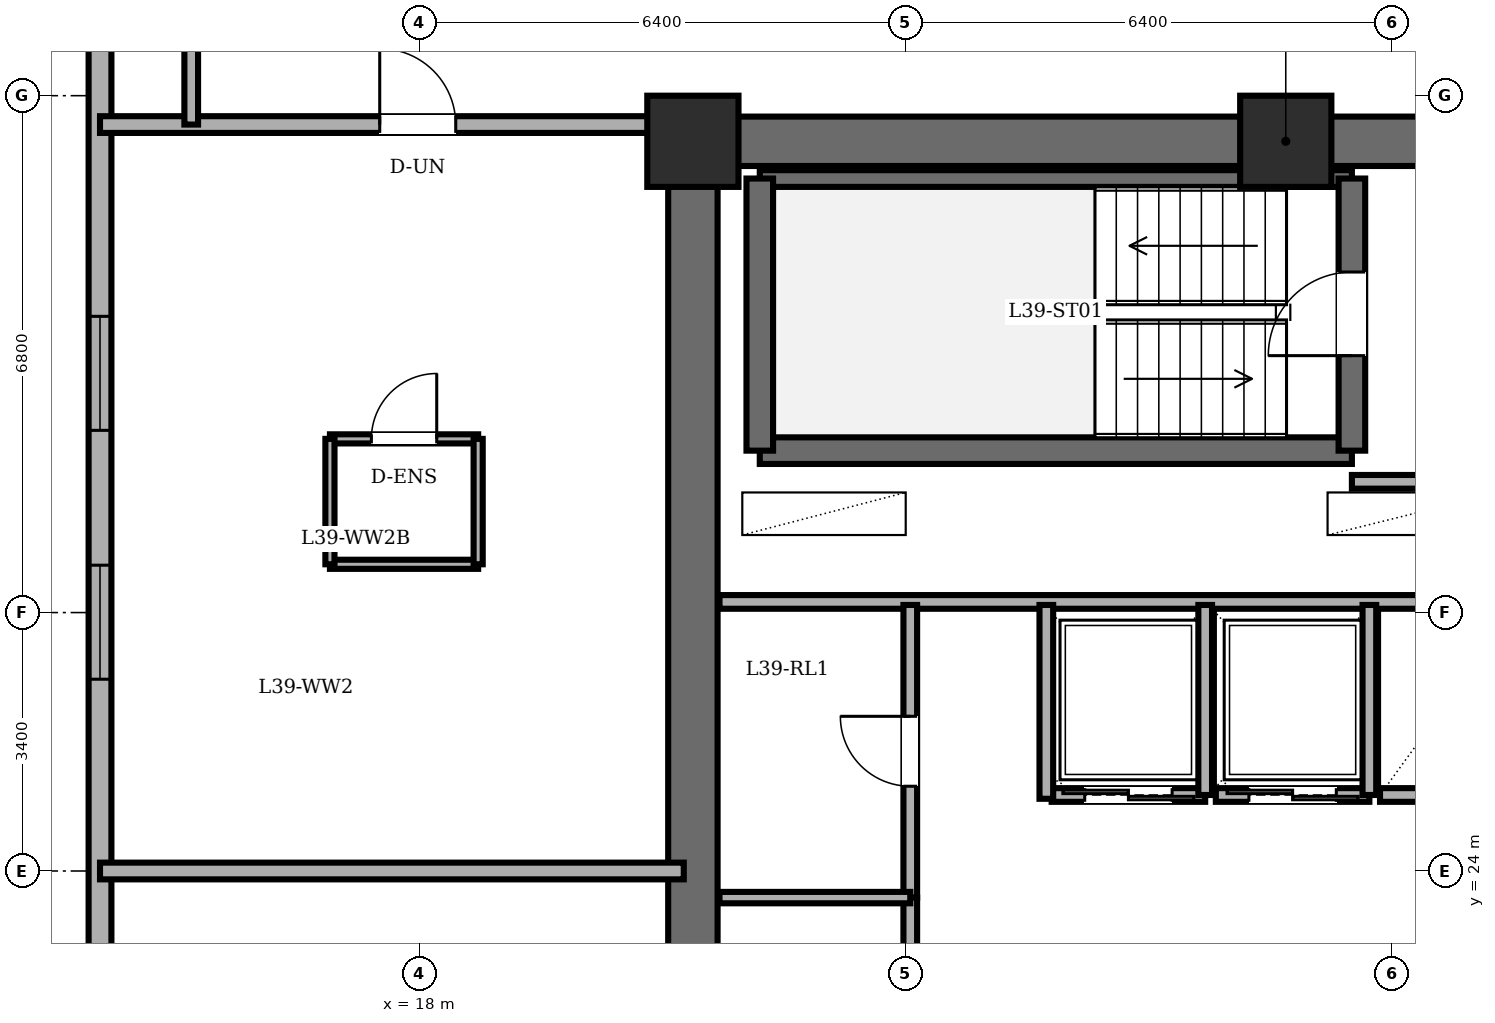
"""IFC4 building model, lengths in metres.
Left out: names, types, materials, properties, quantities, classifications, styles, units other than length and angle.
Written with IfcOpenShell. Run it as: python <this file> out.ifc"""

import sys

from ifc_helpers import new_model, si_unit, direction, frame, frame_2d, origin, origin_2d, place, context, subcontext, project, spatial, rectangle, extrude, element, fill, save


model = new_model("IFC4")
c1 = context("Model", 3, precision=1e-05, world=origin(), true_north=direction((0.0, 1.0)))
c2 = subcontext(c1, "Body", "Model", "MODEL_VIEW")
j1 = project(units=[si_unit("LENGTHUNIT", "METRE"), si_unit("PLANEANGLEUNIT", "RADIAN")], contexts=[c1])
p1 = place(None, origin())
s1 = spatial("IfcSite", under=j1, at=p1, CompositionType="ELEMENT")
p2 = place(p1, origin())
s2 = spatial("IfcBuilding", under=s1, at=p2, CompositionType="ELEMENT")
p3 = place(p2, frame((0.0, 0.0, 151.0)))
s3 = spatial("IfcBuildingStorey", under=s2, at=p3, CompositionType="ELEMENT", Elevation=151.0)
for number, where, z_axis, x_axis in (
    (1, (29.4, 33.6, 0.0), (0.0, 0.0, 1.0), (1.0, 0.0, 0.0)),
    (2, (21.6, 33.6, 0.0), (0.0, 0.0, 1.0), (1.0, 0.0, 0.0)),
):
    element("IfcColumn", number, at=place(p3, frame(where, z_axis=z_axis, x_axis=x_axis)), inside=s3, PredefinedType="COLUMN", context=c2, shape_type="SweptSolid", body=[
        extrude(rectangle(XDim=1.2, YDim=1.2, at=origin_2d()), origin(), (0.0, 0.0, 1.0), 3.6),
    ])
p4 = place(p3, frame((13.8, 36.3, 0.0), z_axis=(0.0, 0.0, 1.0), x_axis=(0.0, -1.0, 0.0)))
e3 = element("IfcWall", 3, at=p4, inside=s3, PredefinedType="SOLIDWALL", context=c2, shape_type="SweptSolid", body=[
    extrude(rectangle(XDim=24.6, YDim=0.3, at=frame_2d((12.3, 0.0))), origin(), (0.0, 0.0, 1.0), 3.4),
])
p5 = place(p4, frame((5.003, 0.0, 0.85)))
e4 = element("IfcOpeningElement", 4, at=p5, cuts=e3, PredefinedType="OPENING", context=c2, shape_type="SweptSolid", body=[
    extrude(rectangle(XDim=1.5, YDim=1.55, at=frame_2d((0.75, 0.775))), frame((0.0, 0.16, 0.0), z_axis=(0.0, -1.0, 0.0), x_axis=(1.0, 0.0, 0.0)), (0.0, 0.0, 1.0), 0.32),
])
p6 = place(p4, frame((8.277, 0.0, 0.85)))
e5 = element("IfcOpeningElement", 5, at=p6, cuts=e3, PredefinedType="OPENING", context=c2, shape_type="SweptSolid", body=[
    extrude(rectangle(XDim=1.5, YDim=1.55, at=frame_2d((0.75, 0.775))), frame((0.0, 0.16, 0.0), z_axis=(0.0, -1.0, 0.0), x_axis=(1.0, 0.0, 0.0)), (0.0, 0.0, 1.0), 0.32),
])
p7 = place(p4, frame((14.823, 0.0, 0.85)))
e6 = element("IfcOpeningElement", 6, at=p7, cuts=e3, PredefinedType="OPENING", context=c2, shape_type="SweptSolid", body=[
    extrude(rectangle(XDim=1.5, YDim=1.55, at=frame_2d((0.75, 0.775))), frame((0.0, 0.16, 0.0), z_axis=(0.0, -1.0, 0.0), x_axis=(1.0, 0.0, 0.0)), (0.0, 0.0, 1.0), 0.32),
])
p8 = place(p4, frame((18.097, 0.0, 0.85)))
e7 = element("IfcOpeningElement", 7, at=p8, cuts=e3, PredefinedType="OPENING", context=c2, shape_type="SweptSolid", body=[
    extrude(rectangle(XDim=1.5, YDim=1.55, at=frame_2d((0.75, 0.775))), frame((0.0, 0.16, 0.0), z_axis=(0.0, -1.0, 0.0), x_axis=(1.0, 0.0, 0.0)), (0.0, 0.0, 1.0), 0.32),
])
p9 = place(p3, frame((21.6, 14.4, 0.0), z_axis=(0.0, 0.0, 1.0), x_axis=(0.0, 1.0, 0.0)))
e8 = element("IfcWall", 8, at=p9, inside=s3, PredefinedType="SHEAR", context=c2, shape_type="SweptSolid", body=[
    extrude(rectangle(XDim=19.2, YDim=0.65, at=frame_2d((9.6, 0.0))), origin(), (0.0, 0.0, 1.0), 3.4),
])
p10 = place(p3, frame((21.6, 33.6, 0.0), z_axis=(0.0, 0.0, 1.0), x_axis=(1.0, 0.0, 0.0)))
e9 = element("IfcWall", 9, at=p10, inside=s3, PredefinedType="SHEAR", context=c2, shape_type="SweptSolid", body=[
    extrude(rectangle(XDim=15.6, YDim=0.65, at=frame_2d((7.8, 0.0))), origin(), (0.0, 0.0, 1.0), 3.4),
])
p11 = place(p3, frame((22.48, 29.53, 0.0), z_axis=(0.0, 0.0, 1.0), x_axis=(1.0, 0.0, 0.0)))
e10 = element("IfcWall", 10, at=p11, inside=s3, PredefinedType="SOLIDWALL", context=c2, shape_type="SweptSolid", body=[
    extrude(rectangle(XDim=7.79, YDim=0.35, at=frame_2d((3.895, 0.0))), origin(), (0.0, 0.0, 1.0), 3.4),
])
p12 = place(p3, frame((22.48, 33.11, 0.0), z_axis=(0.0, 0.0, 1.0), x_axis=(1.0, 0.0, 0.0)))
e11 = element("IfcWall", 11, at=p12, inside=s3, PredefinedType="PARTITIONING", context=c2, shape_type="SweptSolid", body=[
    extrude(rectangle(XDim=7.79, YDim=0.22, at=frame_2d((3.895, 0.0))), origin(), (0.0, 0.0, 1.0), 3.4),
])
p13 = place(p3, frame((22.48, 29.53, 0.0), z_axis=(0.0, 0.0, 1.0), x_axis=(0.0, 1.0, 0.0)))
e12 = element("IfcWall", 12, at=p13, inside=s3, PredefinedType="SOLIDWALL", context=c2, shape_type="SweptSolid", body=[
    extrude(rectangle(XDim=3.58, YDim=0.35, at=frame_2d((1.79, 0.0))), origin(), (0.0, 0.0, 1.0), 3.4),
])
p14 = place(p3, frame((30.27, 29.53, 0.0), z_axis=(0.0, 0.0, 1.0), x_axis=(0.0, 1.0, 0.0)))
e13 = element("IfcWall", 13, at=p14, inside=s3, PredefinedType="SOLIDWALL", context=c2, shape_type="SweptSolid", body=[
    extrude(rectangle(XDim=3.58, YDim=0.35, at=frame_2d((1.79, 0.0))), origin(), (0.0, 0.0, 1.0), 3.4),
])
p15 = place(p14, frame((1.25, 0.0, 0.0)))
e14 = element("IfcOpeningElement", 14, at=p15, cuts=e13, PredefinedType="OPENING", context=c2, shape_type="SweptSolid", body=[
    extrude(rectangle(XDim=1.1, YDim=2.15, at=frame_2d((0.55, 1.075))), frame((0.0, 0.185, 0.0), z_axis=(0.0, -1.0, 0.0), x_axis=(1.0, 0.0, 0.0)), (0.0, 0.0, 1.0), 0.37),
])
p16 = place(p3, frame((30.27, 29.12, 0.0), z_axis=(0.0, 0.0, 1.0), x_axis=(1.0, 0.0, 0.0)))
e15 = element("IfcWall", 15, at=p16, inside=s3, PredefinedType="PARTITIONING", context=c2, shape_type="SweptSolid", body=[
    extrude(rectangle(XDim=2.24, YDim=0.18, at=frame_2d((1.12, 0.0))), origin(), (0.0, 0.0, 1.0), 3.4),
])
p17 = place(p3, frame((21.95, 27.54, 0.0), z_axis=(0.0, 0.0, 1.0), x_axis=(1.0, 0.0, 0.0)))
e16 = element("IfcWall", 16, at=p17, inside=s3, PredefinedType="PARTITIONING", context=c2, shape_type="SweptSolid", body=[
    extrude(rectangle(XDim=10.56, YDim=0.18, at=frame_2d((5.28, 0.0))), origin(), (0.0, 0.0, 1.0), 3.4),
])
p18 = place(p3, frame((28.34, 25.0, 0.0), z_axis=(0.0, 0.0, 1.0), x_axis=(-1.0, 0.0, 0.0)))
e17 = element("IfcWall", 17, at=p18, inside=s3, PredefinedType="PARTITIONING", context=c2, shape_type="SweptSolid", body=[
    extrude(rectangle(XDim=2.02, YDim=0.18, at=frame_2d((1.01, 0.0))), origin(), (0.0, 0.0, 1.0), 3.4),
])
p19 = place(p18, frame((0.435, 0.0, 0.0)))
e18 = element("IfcOpeningElement", 18, at=p19, cuts=e17, PredefinedType="OPENING", context=c2, shape_type="SweptSolid", body=[
    extrude(rectangle(XDim=1.15, YDim=2.2, at=frame_2d((0.575, 1.1))), frame((0.0, 0.1, 0.0), z_axis=(0.0, -1.0, 0.0), x_axis=(1.0, 0.0, 0.0)), (0.0, 0.0, 1.0), 0.2),
])
p20 = place(p3, frame((28.34, 25.0, 0.0), z_axis=(0.0, 0.0, 1.0), x_axis=(0.0, 1.0, 0.0)))
e19 = element("IfcWall", 19, at=p20, inside=s3, PredefinedType="PARTITIONING", context=c2, shape_type="SweptSolid", body=[
    extrude(rectangle(XDim=2.5, YDim=0.18, at=frame_2d((1.25, 0.0))), origin(), (0.0, 0.0, 1.0), 3.4),
])
p21 = place(p3, frame((30.5, 25.0, 0.0), z_axis=(0.0, 0.0, 1.0), x_axis=(-1.0, 0.0, 0.0)))
e20 = element("IfcWall", 20, at=p21, inside=s3, PredefinedType="PARTITIONING", context=c2, shape_type="SweptSolid", body=[
    extrude(rectangle(XDim=2.02, YDim=0.18, at=frame_2d((1.01, 0.0))), origin(), (0.0, 0.0, 1.0), 3.4),
])
p22 = place(p21, frame((0.435, 0.0, 0.0)))
e21 = element("IfcOpeningElement", 21, at=p22, cuts=e20, PredefinedType="OPENING", context=c2, shape_type="SweptSolid", body=[
    extrude(rectangle(XDim=1.15, YDim=2.2, at=frame_2d((0.575, 1.1))), frame((0.0, 0.1, 0.0), z_axis=(0.0, -1.0, 0.0), x_axis=(1.0, 0.0, 0.0)), (0.0, 0.0, 1.0), 0.2),
])
p23 = place(p3, frame((30.5, 25.0, 0.0), z_axis=(0.0, 0.0, 1.0), x_axis=(0.0, 1.0, 0.0)))
e22 = element("IfcWall", 22, at=p23, inside=s3, PredefinedType="PARTITIONING", context=c2, shape_type="SweptSolid", body=[
    extrude(rectangle(XDim=2.5, YDim=0.18, at=frame_2d((1.25, 0.0))), origin(), (0.0, 0.0, 1.0), 3.4),
])
p24 = place(p3, frame((32.46, 25.0, 0.0), z_axis=(0.0, 0.0, 1.0), x_axis=(-1.0, 0.0, 0.0)))
e23 = element("IfcWall", 23, at=p24, inside=s3, PredefinedType="PARTITIONING", context=c2, shape_type="SweptSolid", body=[
    extrude(rectangle(XDim=1.82, YDim=0.18, at=frame_2d((0.91, 0.0))), origin(), (0.0, 0.0, 1.0), 3.4),
])
p25 = place(p3, frame((24.46, 23.65, 0.0), z_axis=(0.0, 0.0, 1.0), x_axis=(0.0, 1.0, 0.0)))
e24 = element("IfcWall", 24, at=p25, inside=s3, PredefinedType="PARTITIONING", context=c2, shape_type="SweptSolid", body=[
    extrude(rectangle(XDim=3.85, YDim=0.18, at=frame_2d((1.925, 0.0))), origin(), (0.0, 0.0, 1.0), 3.4),
])
p26 = place(p25, frame((1.465, 0.0, 0.0)))
e25 = element("IfcOpeningElement", 25, at=p26, cuts=e24, PredefinedType="OPENING", context=c2, shape_type="SweptSolid", body=[
    extrude(rectangle(XDim=0.92, YDim=2.1, at=frame_2d((0.46, 1.05))), frame((0.0, 0.1, 0.0), z_axis=(0.0, -1.0, 0.0), x_axis=(1.0, 0.0, 0.0)), (0.0, 0.0, 1.0), 0.2),
])
p27 = place(p3, frame((24.46, 19.8, 0.0), z_axis=(0.0, 0.0, 1.0), x_axis=(0.0, 1.0, 0.0)))
e26 = element("IfcWall", 26, at=p27, inside=s3, PredefinedType="PARTITIONING", context=c2, shape_type="SweptSolid", body=[
    extrude(rectangle(XDim=3.85, YDim=0.18, at=frame_2d((1.925, 0.0))), origin(), (0.0, 0.0, 1.0), 3.4),
])
p28 = place(p27, frame((1.465, 0.0, 0.0)))
e27 = element("IfcOpeningElement", 27, at=p28, cuts=e26, PredefinedType="OPENING", context=c2, shape_type="SweptSolid", body=[
    extrude(rectangle(XDim=0.92, YDim=2.1, at=frame_2d((0.46, 1.05))), frame((0.0, 0.1, 0.0), z_axis=(0.0, -1.0, 0.0), x_axis=(1.0, 0.0, 0.0)), (0.0, 0.0, 1.0), 0.2),
])
p29 = place(p3, frame((21.95, 23.65, 0.0), z_axis=(0.0, 0.0, 1.0), x_axis=(1.0, 0.0, 0.0)))
e28 = element("IfcWall", 28, at=p29, inside=s3, PredefinedType="PARTITIONING", context=c2, shape_type="SweptSolid", body=[
    extrude(rectangle(XDim=2.51, YDim=0.15, at=frame_2d((1.255, 0.0))), origin(), (0.0, 0.0, 1.0), 3.4),
])
p30 = place(p3, frame((26.25, 24.95, 0.0), z_axis=(0.0, 0.0, 1.0), x_axis=(0.0, 1.0, 0.0)))
e29 = element("IfcWall", 29, at=p30, inside=s3, PredefinedType="PARTITIONING", context=c2, shape_type="SweptSolid", body=[
    extrude(rectangle(XDim=2.55, YDim=0.18, at=frame_2d((1.275, 0.0))), origin(), (0.0, 0.0, 1.0), 3.4),
])
p31 = place(p3, frame((16.825, 29.685, 0.0), z_axis=(0.0, 0.0, 1.0), x_axis=(1.0, 0.0, 0.0)))
e30 = element("IfcWall", 30, at=p31, inside=s3, PredefinedType="PARTITIONING", context=c2, shape_type="SweptSolid", body=[
    extrude(rectangle(XDim=1.95, YDim=0.12, at=frame_2d((0.975, 0.0))), origin(), (0.0, 0.0, 1.0), 3.4),
])
p32 = place(p31, frame((0.545, 0.0, 0.0)))
e31 = element("IfcOpeningElement", 31, at=p32, cuts=e30, PredefinedType="OPENING", context=c2, shape_type="SweptSolid", body=[
    extrude(rectangle(XDim=0.86, YDim=2.1, at=frame_2d((0.43, 1.05))), frame((0.0, 0.07, 0.0), z_axis=(0.0, -1.0, 0.0), x_axis=(1.0, 0.0, 0.0)), (0.0, 0.0, 1.0), 0.14),
])
p33 = place(p3, frame((18.775, 28.035, 0.0), z_axis=(0.0, 0.0, 1.0), x_axis=(-1.0, 0.0, 0.0)))
e32 = element("IfcWall", 32, at=p33, inside=s3, PredefinedType="PARTITIONING", context=c2, shape_type="SweptSolid", body=[
    extrude(rectangle(XDim=1.95, YDim=0.12, at=frame_2d((0.975, 0.0))), origin(), (0.0, 0.0, 1.0), 3.4),
])
for number, where, z_axis, x_axis in (
    (33, (16.825, 29.685, 0.0), (0.0, 0.0, 1.0), (0.0, -1.0, 0.0)),
    (34, (18.775, 28.035, 0.0), (0.0, 0.0, 1.0), (0.0, 1.0, 0.0)),
):
    element("IfcWall", number, at=place(p3, frame(where, z_axis=z_axis, x_axis=x_axis)), inside=s3, PredefinedType="PARTITIONING", context=c2, shape_type="SweptSolid", body=[
        extrude(rectangle(XDim=1.65, YDim=0.12, at=frame_2d((0.825, 0.0))), origin(), (0.0, 0.0, 1.0), 3.4),
    ])
p34 = place(p3, frame((13.8, 24.0, 0.0), z_axis=(0.0, 0.0, 1.0), x_axis=(1.0, 0.0, 0.0)))
e35 = element("IfcWall", 35, at=p34, inside=s3, PredefinedType="PARTITIONING", context=c2, shape_type="SweptSolid", body=[
    extrude(rectangle(XDim=7.68, YDim=0.22, at=frame_2d((3.84, 0.0))), origin(), (0.0, 0.0, 1.0), 3.4),
])
p35 = place(p3, frame((13.8, 33.82, 0.0), z_axis=(0.0, 0.0, 1.0), x_axis=(1.0, 0.0, 0.0)))
e36 = element("IfcWall", 36, at=p35, inside=s3, PredefinedType="PARTITIONING", context=c2, shape_type="SweptSolid", body=[
    extrude(rectangle(XDim=7.68, YDim=0.22, at=frame_2d((3.84, 0.0))), origin(), (0.0, 0.0, 1.0), 3.4),
])
p36 = place(p35, frame((3.68, 0.0, 0.0)))
e37 = element("IfcOpeningElement", 37, at=p36, cuts=e36, PredefinedType="OPENING", context=c2, shape_type="SweptSolid", body=[
    extrude(rectangle(XDim=1.0, YDim=2.15, at=frame_2d((0.5, 1.075))), frame((0.0, 0.12, 0.0), z_axis=(0.0, -1.0, 0.0), x_axis=(1.0, 0.0, 0.0)), (0.0, 0.0, 1.0), 0.24),
])
p37 = place(p3, frame((15.0, 33.82, 0.0), z_axis=(0.0, 0.0, 1.0), x_axis=(0.0, 1.0, 0.0)))
e38 = element("IfcWall", 38, at=p37, inside=s3, PredefinedType="PARTITIONING", context=c2, shape_type="SweptSolid", body=[
    extrude(rectangle(XDim=5.693, YDim=0.18, at=frame_2d((2.846, 0.0))), origin(), (0.0, 0.0, 1.0), 3.4),
])
p38 = place(p5, origin())
e39 = element("IfcWindow", 39, at=p38, inside=s3, PartitioningType="DOUBLE_PANEL_VERTICAL", PredefinedType="WINDOW", context=c2, shape_type="SweptSolid", body=[
    extrude(rectangle(XDim=1.5, YDim=1.55, at=frame_2d((0.75, 0.775))), frame((0.0, 0.03, 0.0), z_axis=(0.0, -1.0, 0.0), x_axis=(1.0, 0.0, 0.0)), (0.0, 0.0, 1.0), 0.06),
])
fill(e4, e39)
p39 = place(p6, origin())
e40 = element("IfcWindow", 40, at=p39, inside=s3, PartitioningType="DOUBLE_PANEL_VERTICAL", PredefinedType="WINDOW", context=c2, shape_type="SweptSolid", body=[
    extrude(rectangle(XDim=1.5, YDim=1.55, at=frame_2d((0.75, 0.775))), frame((0.0, 0.03, 0.0), z_axis=(0.0, -1.0, 0.0), x_axis=(1.0, 0.0, 0.0)), (0.0, 0.0, 1.0), 0.06),
])
fill(e5, e40)
p40 = place(p15, origin())
e41 = element("IfcDoor", 41, at=p40, inside=s3, OperationType="SINGLE_SWING_LEFT", PredefinedType="DOOR", context=c2, shape_type="SweptSolid", body=[
    extrude(rectangle(XDim=1.1, YDim=2.15, at=frame_2d((0.55, 1.075))), frame((0.0, 0.025, 0.0), z_axis=(0.0, -1.0, 0.0), x_axis=(1.0, 0.0, 0.0)), (0.0, 0.0, 1.0), 0.05),
])
fill(e14, e41)
p41 = place(p19, origin())
e42 = element("IfcDoor", 42, at=p41, inside=s3, OperationType="DOUBLE_DOOR_SLIDING", PredefinedType="DOOR", context=c2, shape_type="SweptSolid", body=[
    extrude(rectangle(XDim=1.15, YDim=2.2, at=frame_2d((0.575, 1.1))), frame((0.0, 0.025, 0.0), z_axis=(0.0, -1.0, 0.0), x_axis=(1.0, 0.0, 0.0)), (0.0, 0.0, 1.0), 0.05),
])
fill(e18, e42)
p42 = place(p22, origin())
e43 = element("IfcDoor", 43, at=p42, inside=s3, OperationType="DOUBLE_DOOR_SLIDING", PredefinedType="DOOR", context=c2, shape_type="SweptSolid", body=[
    extrude(rectangle(XDim=1.15, YDim=2.2, at=frame_2d((0.575, 1.1))), frame((0.0, 0.025, 0.0), z_axis=(0.0, -1.0, 0.0), x_axis=(1.0, 0.0, 0.0)), (0.0, 0.0, 1.0), 0.05),
])
fill(e21, e43)
p43 = place(p26, origin())
e44 = element("IfcDoor", 44, at=p43, inside=s3, OperationType="SINGLE_SWING_RIGHT", PredefinedType="DOOR", context=c2, shape_type="SweptSolid", body=[
    extrude(rectangle(XDim=0.92, YDim=2.1, at=frame_2d((0.46, 1.05))), frame((0.0, 0.025, 0.0), z_axis=(0.0, -1.0, 0.0), x_axis=(1.0, 0.0, 0.0)), (0.0, 0.0, 1.0), 0.05),
])
fill(e25, e44)
p44 = place(p32, origin())
e45 = element("IfcDoor", 45, at=p44, inside=s3, OperationType="SINGLE_SWING_RIGHT", PredefinedType="DOOR", context=c2, shape_type="SweptSolid", body=[
    extrude(rectangle(XDim=0.86, YDim=2.1, at=frame_2d((0.43, 1.05))), frame((0.0, 0.025, 0.0), z_axis=(0.0, -1.0, 0.0), x_axis=(1.0, 0.0, 0.0)), (0.0, 0.0, 1.0), 0.05),
])
fill(e31, e45)
p45 = place(p36, origin())
e46 = element("IfcDoor", 46, at=p45, inside=s3, OperationType="SINGLE_SWING_LEFT", PredefinedType="DOOR", context=c2, shape_type="SweptSolid", body=[
    extrude(rectangle(XDim=1.0, YDim=2.15, at=frame_2d((0.5, 1.075))), frame((0.0, 0.025, 0.0), z_axis=(0.0, -1.0, 0.0), x_axis=(1.0, 0.0, 0.0)), (0.0, 0.0, 1.0), 0.05),
])
fill(e37, e46)
save(model, sys.argv[1])
